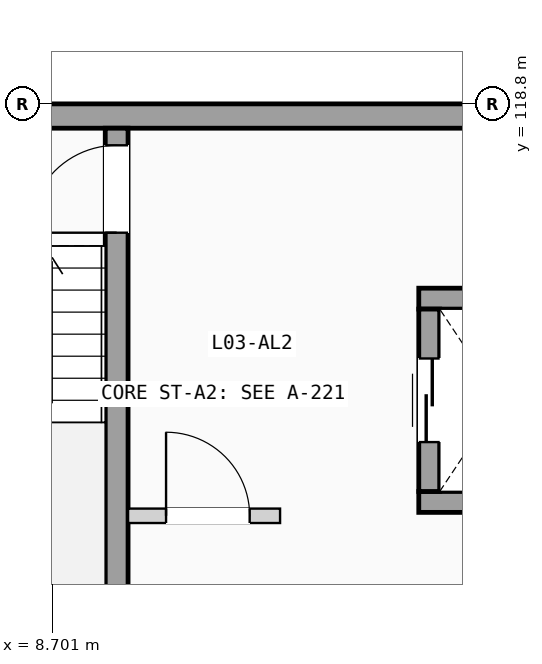
"""IFC4 building model, lengths in metres.
Left out: names, types, materials, properties, quantities, classifications, styles, units other than length and angle.
Written with IfcOpenShell. Run it as: python <this file> out.ifc"""

import sys

from ifc_helpers import new_model, si_unit, direction, frame, frame_2d, origin, place, context, subcontext, project, spatial, rectangle, extrude, element, fill, save


model = new_model("IFC4")
c1 = context("Model", 3, precision=1e-05, world=origin(), true_north=direction((0.0, 1.0)))
c2 = subcontext(c1, "Body", "Model", "MODEL_VIEW")
j1 = project(units=[si_unit("LENGTHUNIT", "METRE"), si_unit("PLANEANGLEUNIT", "RADIAN")], contexts=[c1])
p1 = place(None, origin())
s1 = spatial("IfcSite", under=j1, at=p1, CompositionType="ELEMENT")
p2 = place(p1, origin())
s2 = spatial("IfcBuilding", under=s1, at=p2, CompositionType="ELEMENT")
p3 = place(p2, frame((0.0, 0.0, 12.075)))
s3 = spatial("IfcBuildingStorey", under=s2, at=p3, CompositionType="ELEMENT", Elevation=12.075)
p4 = place(p3, frame((0.0, 118.64, 0.0), z_axis=(0.0, 0.0, 1.0), x_axis=(1.0, 0.0, 0.0)))
e1 = element("IfcWall", 1, at=p4, inside=s3, PredefinedType="SOLIDWALL", context=c2, shape_type="SweptSolid", body=[
    extrude(rectangle(XDim=21.6, YDim=0.32, at=frame_2d((10.8, 0.0))), origin(), (0.0, 0.0, 1.0), 2.89),
])
p5 = place(p3, frame((9.55, 111.48, 0.0), z_axis=(0.0, 0.0, 1.0), x_axis=(0.0, 1.0, 0.0)))
e2 = element("IfcWall", 2, at=p5, inside=s3, PredefinedType="SHEAR", context=c2, shape_type="SweptSolid", body=[
    extrude(rectangle(XDim=7.0, YDim=0.3, at=frame_2d((3.5, 0.0))), origin(), (0.0, 0.0, 1.0), 2.89),
])
p6 = place(p5, frame((5.625, 0.0, 0.0)))
e3 = element("IfcOpeningElement", 3, at=p6, cuts=e2, PredefinedType="OPENING", context=c2, shape_type="SweptSolid", body=[
    extrude(rectangle(XDim=1.15, YDim=2.12, at=frame_2d((0.575, 1.06))), frame((0.0, 0.16, 0.0), z_axis=(0.0, -1.0, 0.0), x_axis=(1.0, 0.0, 0.0)), (0.0, 0.0, 1.0), 0.32),
])
for number, where, z_axis, x_axis in (
    (4, (13.525, 113.562, 0.0), (0.0, 0.0, 1.0), (1.0, 0.0, 0.0)),
    (5, (13.525, 116.238, 0.0), (0.0, 0.0, 1.0), (1.0, 0.0, 0.0)),
):
    element("IfcWall", number, at=place(p3, frame(where, z_axis=z_axis, x_axis=x_axis)), inside=s3, PredefinedType="SHEAR", context=c2, shape_type="SweptSolid", body=[
        extrude(rectangle(XDim=2.15, YDim=0.275, at=frame_2d((1.075, 0.0))), origin(), (0.0, 0.0, 1.0), 2.89),
    ])
p7 = place(p3, frame((13.663, 113.7, 0.0), z_axis=(0.0, 0.0, 1.0), x_axis=(0.0, 1.0, 0.0)))
e6 = element("IfcWall", 6, at=p7, inside=s3, PredefinedType="SHEAR", context=c2, shape_type="SweptSolid", body=[
    extrude(rectangle(XDim=2.4, YDim=0.275, at=frame_2d((1.2, 0.0))), origin(), (0.0, 0.0, 1.0), 2.89),
])
p8 = place(p7, frame((0.65, 0.0, 0.0)))
e7 = element("IfcOpeningElement", 7, at=p8, cuts=e6, PredefinedType="OPENING", context=c2, shape_type="SweptSolid", body=[
    extrude(rectangle(XDim=1.1, YDim=2.15, at=frame_2d((0.55, 1.075))), frame((0.0, 0.147, 0.0), z_axis=(0.0, -1.0, 0.0), x_axis=(1.0, 0.0, 0.0)), (0.0, 0.0, 1.0), 0.295),
])
p9 = place(p3, frame((9.7, 113.38, 0.0), z_axis=(0.0, 0.0, 1.0), x_axis=(1.0, 0.0, 0.0)))
e8 = element("IfcWall", 8, at=p9, inside=s3, PredefinedType="PARTITIONING", context=c2, shape_type="SweptSolid", body=[
    extrude(rectangle(XDim=2.0, YDim=0.19, at=frame_2d((1.0, 0.0))), origin(), (0.0, 0.0, 1.0), 2.87),
])
p10 = place(p9, frame((0.5, 0.0, 0.0)))
e9 = element("IfcOpeningElement", 9, at=p10, cuts=e8, PredefinedType="OPENING", context=c2, shape_type="SweptSolid", body=[
    extrude(rectangle(XDim=1.1, YDim=2.12, at=frame_2d((0.55, 1.06))), frame((0.0, 0.105, 0.0), z_axis=(0.0, -1.0, 0.0), x_axis=(1.0, 0.0, 0.0)), (0.0, 0.0, 1.0), 0.21),
])
p11 = place(p6, origin())
e10 = element("IfcDoor", 10, at=p11, inside=s3, OperationType="SINGLE_SWING_LEFT", PredefinedType="DOOR", context=c2, shape_type="SweptSolid", body=[
    extrude(rectangle(XDim=1.15, YDim=2.12, at=frame_2d((0.575, 1.06))), frame((0.0, 0.025, 0.0), z_axis=(0.0, -1.0, 0.0), x_axis=(1.0, 0.0, 0.0)), (0.0, 0.0, 1.0), 0.05),
])
fill(e3, e10)
p12 = place(p8, origin())
e11 = element("IfcDoor", 11, at=p12, inside=s3, OperationType="SLIDING_TO_LEFT", PredefinedType="DOOR", context=c2, shape_type="SweptSolid", body=[
    extrude(rectangle(XDim=1.1, YDim=2.15, at=frame_2d((0.55, 1.075))), frame((0.0, 0.025, 0.0), z_axis=(0.0, -1.0, 0.0), x_axis=(1.0, 0.0, 0.0)), (0.0, 0.0, 1.0), 0.05),
])
fill(e7, e11)
p13 = place(p10, origin())
e12 = element("IfcDoor", 12, at=p13, inside=s3, OperationType="SINGLE_SWING_LEFT", PredefinedType="DOOR", context=c2, shape_type="SweptSolid", body=[
    extrude(rectangle(XDim=1.1, YDim=2.12, at=frame_2d((0.55, 1.06))), frame((0.0, 0.025, 0.0), z_axis=(0.0, -1.0, 0.0), x_axis=(1.0, 0.0, 0.0)), (0.0, 0.0, 1.0), 0.05),
])
fill(e9, e12)
save(model, sys.argv[1])
